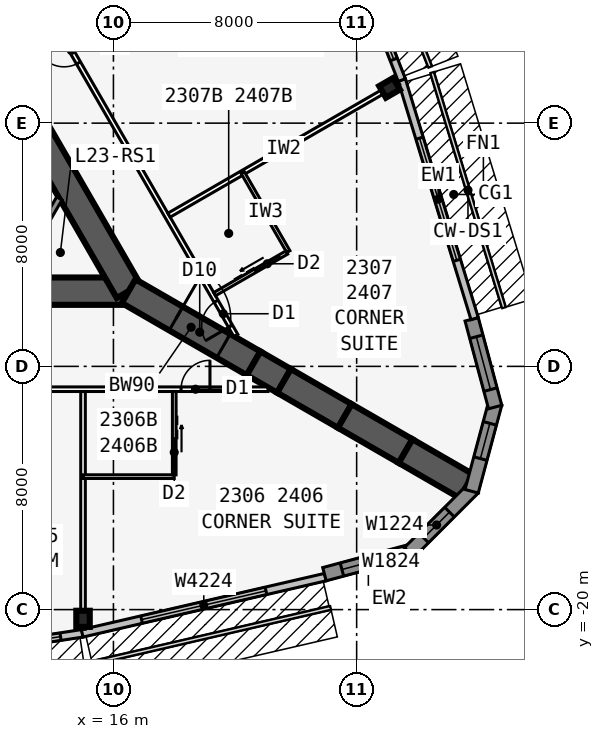
"""IFC4 building model, lengths in metres.
Left out: names, types, materials, properties, quantities, classifications, styles, units other than length and angle.
Written with IfcOpenShell. Run it as: python <this file> out.ifc"""

import sys

from ifc_helpers import new_model, si_unit, direction, frame, frame_2d, origin, origin_2d, place, context, subcontext, project, spatial, polyline, rectangle, i_section, outline, extrude, element, fill, save


model = new_model("IFC4")
c1 = context("Model", 3, precision=1e-05, world=origin(), true_north=direction((0.0, 1.0)))
c2 = subcontext(c1, "Body", "Model", "MODEL_VIEW")
j1 = project(units=[si_unit("LENGTHUNIT", "METRE"), si_unit("PLANEANGLEUNIT", "RADIAN")], contexts=[c1])
p1 = place(None, origin())
s1 = spatial("IfcSite", under=j1, at=p1, CompositionType="ELEMENT")
p2 = place(p1, origin())
s2 = spatial("IfcBuilding", under=s1, at=p2, CompositionType="ELEMENT")
p3 = place(p2, frame((0.0, 0.0, 89.7)))
s3 = spatial("IfcBuildingStorey", under=s2, at=p3, CompositionType="ELEMENT", Elevation=89.7)
p4 = place(p3, frame((-16.5, -9.526, 0.0), z_axis=(0.0, 0.0, 1.0), x_axis=(1.0, 0.0, 0.0)))
e1 = element("IfcWall", 1, at=p4, inside=s3, PredefinedType="SHEAR", context=c2, shape_type="SweptSolid", body=[
    extrude(rectangle(XDim=33.0, YDim=0.9, at=frame_2d((16.5, 0.0))), origin(), (0.0, 0.0, 1.0), 3.4),
])
p5 = place(p4, frame((14.05, 0.0, 0.0)))
e2 = element("IfcOpeningElement", 2, at=p5, cuts=e1, PredefinedType="OPENING", context=c2, shape_type="SweptSolid", body=[
    extrude(rectangle(XDim=1.8, YDim=2.13, at=frame_2d((0.9, 1.065))), frame((0.0, 0.46, 0.0), z_axis=(0.0, -1.0, 0.0), x_axis=(1.0, 0.0, 0.0)), (0.0, 0.0, 1.0), 0.92),
])
p6 = place(p3, frame((16.5, -9.526, 0.0), z_axis=(0.0, 0.0, 1.0), x_axis=(-0.499999749417, 0.866025548458, 0.0)))
e3 = element("IfcWall", 3, at=p6, inside=s3, PredefinedType="SHEAR", context=c2, shape_type="SweptSolid", body=[
    extrude(rectangle(XDim=33.0, YDim=0.9, at=frame_2d((16.5, 0.0))), origin(), (0.0, 0.0, 1.0), 3.4),
])
p7 = place(p6, frame((14.15, 0.0, 0.0)))
e4 = element("IfcOpeningElement", 4, at=p7, cuts=e3, PredefinedType="OPENING", context=c2, shape_type="SweptSolid", body=[
    extrude(rectangle(XDim=1.8, YDim=2.13, at=frame_2d((0.9, 1.065))), frame((0.0, 0.46, 0.0), z_axis=(0.0, -1.0, 0.0), x_axis=(1.0, 0.0, 0.0)), (0.0, 0.0, 1.0), 0.92),
])
p8 = place(p6, frame((12.6, 0.0, 0.0)))
e5 = element("IfcOpeningElement", 5, at=p8, cuts=e3, PredefinedType="OPENING", context=c2, shape_type="SweptSolid", body=[
    extrude(rectangle(XDim=1.0, YDim=2.13, at=frame_2d((0.5, 1.065))), frame((0.0, 0.46, 0.0), z_axis=(0.0, -1.0, 0.0), x_axis=(1.0, 0.0, 0.0)), (0.0, 0.0, 1.0), 0.92),
])
p9 = place(p3, frame((16.5, -9.526, 0.0), z_axis=(0.0, 0.0, 1.0), x_axis=(0.866031398331, -0.499989616998, 0.0)))
e6 = element("IfcWall", 6, at=p9, inside=s3, PredefinedType="SHEAR", context=c2, shape_type="SweptSolid", body=[
    extrude(rectangle(XDim=4.746, YDim=0.9, at=frame_2d((2.373, 0.0))), origin(), (0.0, 0.0, 1.0), 3.4),
])
p10 = place(p9, frame((1.8, 0.0, 0.0)))
e7 = element("IfcOpeningElement", 7, at=p10, cuts=e6, PredefinedType="OPENING", context=c2, shape_type="SweptSolid", body=[
    extrude(rectangle(XDim=1.8, YDim=2.13, at=frame_2d((0.9, 1.065))), frame((0.0, 0.46, 0.0), z_axis=(0.0, -1.0, 0.0), x_axis=(1.0, 0.0, 0.0)), (0.0, 0.0, 1.0), 0.92),
])
p11 = place(p3, frame((20.61, -11.899, 0.0), z_axis=(0.0, 0.0, 1.0), x_axis=(0.866009537788, -0.500027479704, 0.0)))
e8 = element("IfcWall", 8, at=p11, inside=s3, PredefinedType="SHEAR", context=c2, shape_type="SweptSolid", body=[
    extrude(rectangle(XDim=1.155, YDim=0.9, at=frame_2d((0.577, 0.0))), origin(), (0.0, 0.0, 1.0), 3.4),
])
for number, where, z_axis, x_axis in (
    (9, (21.61, -12.477, 0.0), (0.0, 0.0, 1.0), (0.866, -0.5, 0.0)),
    (10, (23.61, -13.631, 0.0), (0.0, 0.0, 1.0), (0.866, -0.5, 0.0)),
    (11, (25.61, -14.786, 0.0), (0.0, 0.0, 1.0), (0.866, -0.5, 0.0)),
):
    element("IfcWall", number, at=place(p3, frame(where, z_axis=z_axis, x_axis=x_axis)), inside=s3, PredefinedType="SHEAR", context=c2, shape_type="SweptSolid", body=[
        extrude(rectangle(XDim=2.309, YDim=0.9, at=frame_2d((1.155, 0.0))), origin(), (0.0, 0.0, 1.0), 3.4),
    ])
for number, where, z_axis, x_axis in (
    (12, (15.0, -20.303, 0.0), (0.0, 0.0, 1.0), (1.0, 0.0, 0.0)),
    (13, (25.083, -2.839, 0.0), (0.0, 0.0, 1.0), (-0.5, 0.866, 0.0)),
):
    element("IfcColumn", number, at=place(p3, frame(where, z_axis=z_axis, x_axis=x_axis)), inside=s3, PredefinedType="COLUMN", context=c2, shape_type="SweptSolid", body=[
        extrude(i_section(OverallWidth=0.442, OverallDepth=0.531, WebThickness=0.066, FlangeThickness=0.106, at=origin_2d()), origin(), (0.0, 0.0, 1.0), 3.4),
    ])
p12 = place(p3, frame((9.981, -21.54, 0.0), z_axis=(0.0, 0.0, 1.0), x_axis=(0.988615403399, 0.150464561152, 0.0)))
e14 = element("IfcWall", 14, at=p12, inside=s3, PredefinedType="STANDARD", context=c2, shape_type="SweptSolid", body=[
    extrude(rectangle(XDim=5.058, YDim=0.25, at=frame_2d((2.529, 0.0))), origin(), (0.0, 0.0, 1.0), 3.235),
])
p13 = place(p12, frame((0.729, 0.0, 0.45)))
e15 = element("IfcOpeningElement", 15, at=p13, cuts=e14, PredefinedType="OPENING", context=c2, shape_type="SweptSolid", body=[
    extrude(rectangle(XDim=3.6, YDim=2.4, at=frame_2d((1.8, 1.2))), frame((0.0, 0.135, 0.0), z_axis=(0.0, -1.0, 0.0), x_axis=(1.0, 0.0, 0.0)), (0.0, 0.0, 1.0), 0.27),
])
p14 = place(p3, frame((14.972, -20.781, 0.0), z_axis=(0.0, 0.0, 1.0), x_axis=(0.974279327392, 0.225343720163, 0.0)))
e16 = element("IfcWall", 16, at=p14, inside=s3, PredefinedType="STANDARD", context=c2, shape_type="SweptSolid", body=[
    extrude(rectangle(XDim=8.211, YDim=0.25, at=frame_2d((4.105, 0.0))), origin(), (0.0, 0.0, 1.0), 3.235),
])
p15 = place(p14, frame((2.006, 0.0, 0.45)))
e17 = element("IfcOpeningElement", 17, at=p15, cuts=e16, PredefinedType="OPENING", context=c2, shape_type="SweptSolid", body=[
    extrude(rectangle(XDim=4.2, YDim=2.4, at=frame_2d((2.1, 1.2))), frame((0.0, 0.135, 0.0), z_axis=(0.0, -1.0, 0.0), x_axis=(1.0, 0.0, 0.0)), (0.0, 0.0, 1.0), 0.27),
])
p16 = place(p3, frame((22.942, -18.835, 0.0), z_axis=(0.0, 0.0, 1.0), x_axis=(0.965930548995, 0.258801419081, 0.0)))
e18 = element("IfcWall", 18, at=p16, inside=s3, PredefinedType="SOLIDWALL", context=c2, shape_type="SweptSolid", body=[
    extrude(rectangle(XDim=2.989, YDim=0.45, at=frame_2d((1.494, 0.0))), origin(), (0.0, 0.0, 1.0), 3.235),
])
p17 = place(p16, frame((0.594, 0.0, 0.45)))
e19 = element("IfcOpeningElement", 19, at=p17, cuts=e18, PredefinedType="OPENING", context=c2, shape_type="SweptSolid", body=[
    extrude(rectangle(XDim=1.8, YDim=2.4, at=frame_2d((0.9, 1.2))), frame((0.0, 0.235, 0.0), z_axis=(0.0, -1.0, 0.0), x_axis=(1.0, 0.0, 0.0)), (0.0, 0.0, 1.0), 0.47),
])
p18 = place(p3, frame((25.728, -18.12, 0.0), z_axis=(0.0, 0.0, 1.0), x_axis=(0.707025086683, 0.707188466253, 0.0)))
e20 = element("IfcWall", 20, at=p18, inside=s3, PredefinedType="SOLIDWALL", context=c2, shape_type="SweptSolid", body=[
    extrude(outline(polyline([(2.989, 0.225), (2.93, 0.225), (2.438, 0.093), (2.402, 0.225), (0.0, 0.225), (0.0, -0.225), (2.989, -0.225), (2.989, 0.225)])), origin(), (0.0, 0.0, 1.0), 3.235),
])
p19 = place(p18, frame((0.676, 0.0, 0.45)))
e21 = element("IfcOpeningElement", 21, at=p19, cuts=e20, PredefinedType="OPENING", context=c2, shape_type="SweptSolid", body=[
    extrude(rectangle(XDim=1.2, YDim=2.4, at=frame_2d((0.6, 1.2))), frame((0.0, 0.235, 0.0), z_axis=(0.0, -1.0, 0.0), x_axis=(1.0, 0.0, 0.0)), (0.0, 0.0, 1.0), 0.47),
])
p20 = place(p3, frame((27.783, -16.108, 0.0), z_axis=(0.0, 0.0, 1.0), x_axis=(0.258801419081, 0.965930548995, 0.0)))
e22 = element("IfcWall", 22, at=p20, inside=s3, PredefinedType="SOLIDWALL", context=c2, shape_type="SweptSolid", body=[
    extrude(outline(polyline([(2.989, 0.225), (0.586, 0.225), (0.551, 0.093), (0.06, 0.225), (0.0, 0.225), (0.0, -0.225), (2.989, -0.225), (2.989, 0.225)])), origin(), (0.0, 0.0, 1.0), 3.235),
])
p21 = place(p20, frame((1.113, 0.0, 0.45)))
e23 = element("IfcOpeningElement", 23, at=p21, cuts=e22, PredefinedType="OPENING", context=c2, shape_type="SweptSolid", body=[
    extrude(rectangle(XDim=1.2, YDim=2.4, at=frame_2d((0.6, 1.2))), frame((0.0, 0.235, 0.0), z_axis=(0.0, -1.0, 0.0), x_axis=(1.0, 0.0, 0.0)), (0.0, 0.0, 1.0), 0.47),
])
p22 = place(p3, frame((28.556, -13.337, 0.0), z_axis=(0.0, 0.0, 1.0), x_axis=(-0.258780998834, 0.965936019953, 0.0)))
e24 = element("IfcWall", 24, at=p22, inside=s3, PredefinedType="SOLIDWALL", context=c2, shape_type="SweptSolid", body=[
    extrude(rectangle(XDim=2.989, YDim=0.45, at=frame_2d((1.494, 0.0))), origin(), (0.0, 0.0, 1.0), 3.235),
])
p23 = place(p22, frame((0.594, 0.0, 0.45)))
e25 = element("IfcOpeningElement", 25, at=p23, cuts=e24, PredefinedType="OPENING", context=c2, shape_type="SweptSolid", body=[
    extrude(rectangle(XDim=1.8, YDim=2.4, at=frame_2d((0.9, 1.2))), frame((0.0, 0.235, 0.0), z_axis=(0.0, -1.0, 0.0), x_axis=(1.0, 0.0, 0.0)), (0.0, 0.0, 1.0), 0.47),
])
p24 = place(p3, frame((27.88, -10.429, 0.0), z_axis=(0.0, 0.0, 1.0), x_axis=(-0.2919790669, 0.956424709265, 0.0)))
e26 = element("IfcWall", 26, at=p24, inside=s3, PredefinedType="STANDARD", context=c2, shape_type="SweptSolid", body=[
    extrude(rectangle(XDim=8.211, YDim=0.25, at=frame_2d((4.105, 0.0))), origin(), (0.0, 0.0, 1.0), 3.235),
])
p25 = place(p24, frame((2.006, 0.0, 0.45)))
e27 = element("IfcOpeningElement", 27, at=p25, cuts=e26, PredefinedType="OPENING", context=c2, shape_type="SweptSolid", body=[
    extrude(rectangle(XDim=4.2, YDim=2.4, at=frame_2d((2.1, 1.2))), frame((0.0, 0.135, 0.0), z_axis=(0.0, -1.0, 0.0), x_axis=(1.0, 0.0, 0.0)), (0.0, 0.0, 1.0), 0.27),
])
p26 = place(p3, frame((25.486, -2.584, 0.0), z_axis=(0.0, 0.0, 1.0), x_axis=(-0.364013463868, 0.931393685894, 0.0)))
e28 = element("IfcWall", 28, at=p26, inside=s3, PredefinedType="STANDARD", context=c2, shape_type="SweptSolid", body=[
    extrude(rectangle(XDim=5.058, YDim=0.25, at=frame_2d((2.529, 0.0))), origin(), (0.0, 0.0, 1.0), 3.235),
])
p27 = place(p26, frame((0.729, 0.0, 0.45)))
e29 = element("IfcOpeningElement", 29, at=p27, cuts=e28, PredefinedType="OPENING", context=c2, shape_type="SweptSolid", body=[
    extrude(rectangle(XDim=3.6, YDim=2.4, at=frame_2d((1.8, 1.2))), frame((0.0, 0.135, 0.0), z_axis=(0.0, -1.0, 0.0), x_axis=(1.0, 0.0, 0.0)), (0.0, 0.0, 1.0), 0.27),
])
p28 = place(p3, frame((-21.086, -12.751, 0.0), z_axis=(0.0, 0.0, 1.0), x_axis=(1.0, 0.0, 0.0)))
e30 = element("IfcWall", 30, at=p28, inside=s3, PredefinedType="PARTITIONING", context=c2, shape_type="SweptSolid", body=[
    extrude(rectangle(XDim=42.172, YDim=0.15, at=frame_2d((21.086, 0.0))), origin(), (0.0, 0.0, 1.0), 3.235),
])
p29 = place(p28, frame((1.911, 0.0, 0.0)))
e31 = element("IfcOpeningElement", 31, at=p29, cuts=e30, PredefinedType="OPENING", context=c2, shape_type="SweptSolid", body=[
    extrude(rectangle(XDim=0.95, YDim=2.13, at=frame_2d((0.475, 1.065))), frame((0.0, 0.085, 0.0), z_axis=(0.0, -1.0, 0.0), x_axis=(1.0, 0.0, 0.0)), (0.0, 0.0, 1.0), 0.17),
])
p30 = place(p28, frame((11.911, 0.0, 0.0)))
e32 = element("IfcOpeningElement", 32, at=p30, cuts=e30, PredefinedType="OPENING", context=c2, shape_type="SweptSolid", body=[
    extrude(rectangle(XDim=0.95, YDim=2.13, at=frame_2d((0.475, 1.065))), frame((0.0, 0.085, 0.0), z_axis=(0.0, -1.0, 0.0), x_axis=(1.0, 0.0, 0.0)), (0.0, 0.0, 1.0), 0.17),
])
p31 = place(p28, frame((18.711, 0.0, 0.0)))
e33 = element("IfcOpeningElement", 33, at=p31, cuts=e30, PredefinedType="OPENING", context=c2, shape_type="SweptSolid", body=[
    extrude(rectangle(XDim=0.95, YDim=2.13, at=frame_2d((0.475, 1.065))), frame((0.0, 0.085, 0.0), z_axis=(0.0, -1.0, 0.0), x_axis=(1.0, 0.0, 0.0)), (0.0, 0.0, 1.0), 0.17),
])
p32 = place(p28, frame((23.086, 0.0, 0.0)))
e34 = element("IfcOpeningElement", 34, at=p32, cuts=e30, PredefinedType="OPENING", context=c2, shape_type="SweptSolid", body=[
    extrude(rectangle(XDim=1.0, YDim=2.13, at=frame_2d((0.5, 1.065))), frame((0.0, 0.085, 0.0), z_axis=(0.0, -1.0, 0.0), x_axis=(1.0, 0.0, 0.0)), (0.0, 0.0, 1.0), 0.17),
])
p33 = place(p28, frame((27.511, 0.0, 0.0)))
e35 = element("IfcOpeningElement", 35, at=p33, cuts=e30, PredefinedType="OPENING", context=c2, shape_type="SweptSolid", body=[
    extrude(rectangle(XDim=0.95, YDim=2.13, at=frame_2d((0.475, 1.065))), frame((0.0, 0.085, 0.0), z_axis=(0.0, -1.0, 0.0), x_axis=(1.0, 0.0, 0.0)), (0.0, 0.0, 1.0), 0.17),
])
p34 = place(p28, frame((33.711, 0.0, 0.0)))
e36 = element("IfcOpeningElement", 36, at=p34, cuts=e30, PredefinedType="OPENING", context=c2, shape_type="SweptSolid", body=[
    extrude(rectangle(XDim=0.95, YDim=2.13, at=frame_2d((0.475, 1.065))), frame((0.0, 0.085, 0.0), z_axis=(0.0, -1.0, 0.0), x_axis=(1.0, 0.0, 0.0)), (0.0, 0.0, 1.0), 0.17),
])
p35 = place(p28, frame((39.311, 0.0, 0.0)))
e37 = element("IfcOpeningElement", 37, at=p35, cuts=e30, PredefinedType="OPENING", context=c2, shape_type="SweptSolid", body=[
    extrude(rectangle(XDim=0.95, YDim=2.13, at=frame_2d((0.475, 1.065))), frame((0.0, 0.085, 0.0), z_axis=(0.0, -1.0, 0.0), x_axis=(1.0, 0.0, 0.0)), (0.0, 0.0, 1.0), 0.17),
])
p36 = place(p3, frame((15.0, -12.826, 0.0), z_axis=(0.0, 0.0, 1.0), x_axis=(0.0, -1.0, 0.0)))
e38 = element("IfcWall", 38, at=p36, inside=s3, PredefinedType="PARTITIONING", context=c2, shape_type="SweptSolid", body=[
    extrude(rectangle(XDim=7.82, YDim=0.15, at=frame_2d((3.91, 0.0))), origin(), (0.0, 0.0, 1.0), 2.389),
])
p37 = place(p3, frame((15.0, -15.626, 0.0), z_axis=(0.0, 0.0, 1.0), x_axis=(1.0, 0.0, 0.0)))
e39 = element("IfcWall", 39, at=p37, inside=s3, PredefinedType="PLUMBINGWALL", context=c2, shape_type="SweptSolid", body=[
    extrude(rectangle(XDim=3.0, YDim=0.12, at=frame_2d((1.5, 0.0))), origin(), (0.0, 0.0, 1.0), 3.235),
])
p38 = place(p3, frame((18.0, -12.826, 0.0), z_axis=(0.0, 0.0, 1.0), x_axis=(0.0, -1.0, 0.0)))
e40 = element("IfcWall", 40, at=p38, inside=s3, PredefinedType="PLUMBINGWALL", context=c2, shape_type="SweptSolid", body=[
    extrude(rectangle(XDim=2.74, YDim=0.12, at=frame_2d((1.37, 0.0))), origin(), (0.0, 0.0, 1.0), 3.235),
])
p39 = place(p38, frame((1.55, 0.0, 0.0)))
e41 = element("IfcOpeningElement", 41, at=p39, cuts=e40, PredefinedType="OPENING", context=c2, shape_type="SweptSolid", body=[
    extrude(rectangle(XDim=0.9, YDim=2.13, at=frame_2d((0.45, 1.065))), frame((0.0, 0.07, 0.0), z_axis=(0.0, -1.0, 0.0), x_axis=(1.0, 0.0, 0.0)), (0.0, 0.0, 1.0), 0.14),
])
p40 = place(p3, frame((20.027, -10.985, 0.0), z_axis=(0.0, 0.0, 1.0), x_axis=(-0.500001677587, 0.866024435227, 0.0)))
e42 = element("IfcWall", 42, at=p40, inside=s3, PredefinedType="PARTITIONING", context=c2, shape_type="SweptSolid", body=[
    extrude(rectangle(XDim=39.054, YDim=0.15, at=frame_2d((19.527, 0.0))), origin(), (0.0, 0.0, 1.0), 3.235),
])
p41 = place(p40, frame((0.352, 0.0, 0.0)))
e43 = element("IfcOpeningElement", 43, at=p41, cuts=e42, PredefinedType="OPENING", context=c2, shape_type="SweptSolid", body=[
    extrude(rectangle(XDim=0.95, YDim=2.13, at=frame_2d((0.475, 1.065))), frame((0.0, 0.085, 0.0), z_axis=(0.0, -1.0, 0.0), x_axis=(1.0, 0.0, 0.0)), (0.0, 0.0, 1.0), 0.17),
])
p42 = place(p40, frame((10.352, 0.0, 0.0)))
e44 = element("IfcOpeningElement", 44, at=p42, cuts=e42, PredefinedType="OPENING", context=c2, shape_type="SweptSolid", body=[
    extrude(rectangle(XDim=0.95, YDim=2.13, at=frame_2d((0.475, 1.065))), frame((0.0, 0.085, 0.0), z_axis=(0.0, -1.0, 0.0), x_axis=(1.0, 0.0, 0.0)), (0.0, 0.0, 1.0), 0.17),
])
p43 = place(p40, frame((17.752, 0.0, 0.0)))
e45 = element("IfcOpeningElement", 45, at=p43, cuts=e42, PredefinedType="OPENING", context=c2, shape_type="SweptSolid", body=[
    extrude(rectangle(XDim=0.95, YDim=2.13, at=frame_2d((0.475, 1.065))), frame((0.0, 0.085, 0.0), z_axis=(0.0, -1.0, 0.0), x_axis=(1.0, 0.0, 0.0)), (0.0, 0.0, 1.0), 0.17),
])
p44 = place(p40, frame((26.552, 0.0, 0.0)))
e46 = element("IfcOpeningElement", 46, at=p44, cuts=e42, PredefinedType="OPENING", context=c2, shape_type="SweptSolid", body=[
    extrude(rectangle(XDim=0.95, YDim=2.13, at=frame_2d((0.475, 1.065))), frame((0.0, 0.085, 0.0), z_axis=(0.0, -1.0, 0.0), x_axis=(1.0, 0.0, 0.0)), (0.0, 0.0, 1.0), 0.17),
])
p45 = place(p40, frame((37.752, 0.0, 0.0)))
e47 = element("IfcOpeningElement", 47, at=p45, cuts=e42, PredefinedType="OPENING", context=c2, shape_type="SweptSolid", body=[
    extrude(rectangle(XDim=0.95, YDim=2.13, at=frame_2d((0.475, 1.065))), frame((0.0, 0.085, 0.0), z_axis=(0.0, -1.0, 0.0), x_axis=(1.0, 0.0, 0.0)), (0.0, 0.0, 1.0), 0.17),
])
p46 = place(p3, frame((17.829, -7.027, 0.0), z_axis=(0.0, 0.0, 1.0), x_axis=(0.866032659912, 0.499987431809, 0.0)))
e48 = element("IfcWall", 48, at=p46, inside=s3, PredefinedType="PARTITIONING", context=c2, shape_type="SweptSolid", body=[
    extrude(rectangle(XDim=8.72, YDim=0.15, at=frame_2d((4.36, 0.0))), origin(), (0.0, 0.0, 1.0), 2.389),
])
p47 = place(p3, frame((21.753, -8.225, 0.0), z_axis=(0.0, 0.0, 1.0), x_axis=(-0.499990139034, 0.866031096941, 0.0)))
e49 = element("IfcWall", 49, at=p47, inside=s3, PredefinedType="PLUMBINGWALL", context=c2, shape_type="SweptSolid", body=[
    extrude(rectangle(XDim=3.0, YDim=0.12, at=frame_2d((1.5, 0.0))), origin(), (0.0, 0.0, 1.0), 3.235),
])
p48 = place(p3, frame((19.329, -9.625, 0.0), z_axis=(0.0, 0.0, 1.0), x_axis=(0.866035715982, 0.499982138324, 0.0)))
e50 = element("IfcWall", 50, at=p48, inside=s3, PredefinedType="PLUMBINGWALL", context=c2, shape_type="SweptSolid", body=[
    extrude(rectangle(XDim=2.74, YDim=0.12, at=frame_2d((1.37, 0.0))), origin(), (0.0, 0.0, 1.0), 3.235),
])
p49 = place(p48, frame((1.55, 0.0, 0.0)))
e51 = element("IfcOpeningElement", 51, at=p49, cuts=e50, PredefinedType="OPENING", context=c2, shape_type="SweptSolid", body=[
    extrude(rectangle(XDim=0.9, YDim=2.13, at=frame_2d((0.45, 1.065))), frame((0.0, 0.07, 0.0), z_axis=(0.0, -1.0, 0.0), x_axis=(1.0, 0.0, 0.0)), (0.0, 0.0, 1.0), 0.14),
])
p50 = place(p3, frame((14.219, -6.476, 0.0), z_axis=(0.0, 0.0, 1.0), x_axis=(-0.499952404951, -0.866052881055, 0.0)))
e52 = element("IfcWall", 52, at=p50, inside=s3, PredefinedType="SOLIDWALL", context=c2, shape_type="SweptSolid", body=[
    extrude(rectangle(XDim=3.002, YDim=0.2, at=frame_2d((1.501, 0.0))), origin(), (0.0, 0.0, 1.0), 3.235),
])
p51 = place(p13, origin())
e53 = element("IfcWindow", 53, at=p51, inside=s3, PartitioningType="SINGLE_PANEL", PredefinedType="WINDOW", context=c2, shape_type="SweptSolid", body=[
    extrude(rectangle(XDim=3.6, YDim=2.4, at=frame_2d((1.8, 1.2))), frame((0.0, 0.03, 0.0), z_axis=(0.0, -1.0, 0.0), x_axis=(1.0, 0.0, 0.0)), (0.0, 0.0, 1.0), 0.06),
])
fill(e15, e53)
p52 = place(p15, origin())
e54 = element("IfcWindow", 54, at=p52, inside=s3, PartitioningType="SINGLE_PANEL", PredefinedType="WINDOW", context=c2, shape_type="SweptSolid", body=[
    extrude(rectangle(XDim=4.2, YDim=2.4, at=frame_2d((2.1, 1.2))), frame((0.0, 0.03, 0.0), z_axis=(0.0, -1.0, 0.0), x_axis=(1.0, 0.0, 0.0)), (0.0, 0.0, 1.0), 0.06),
])
fill(e17, e54)
p53 = place(p17, origin())
e55 = element("IfcWindow", 55, at=p53, inside=s3, PartitioningType="SINGLE_PANEL", PredefinedType="WINDOW", context=c2, shape_type="SweptSolid", body=[
    extrude(rectangle(XDim=1.8, YDim=2.4, at=frame_2d((0.9, 1.2))), frame((0.0, 0.03, 0.0), z_axis=(0.0, -1.0, 0.0), x_axis=(1.0, 0.0, 0.0)), (0.0, 0.0, 1.0), 0.06),
])
fill(e19, e55)
p54 = place(p19, origin())
e56 = element("IfcWindow", 56, at=p54, inside=s3, PartitioningType="SINGLE_PANEL", PredefinedType="WINDOW", context=c2, shape_type="SweptSolid", body=[
    extrude(rectangle(XDim=1.2, YDim=2.4, at=frame_2d((0.6, 1.2))), frame((0.0, 0.03, 0.0), z_axis=(0.0, -1.0, 0.0), x_axis=(1.0, 0.0, 0.0)), (0.0, 0.0, 1.0), 0.06),
])
fill(e21, e56)
p55 = place(p21, origin())
e57 = element("IfcWindow", 57, at=p55, inside=s3, PartitioningType="SINGLE_PANEL", PredefinedType="WINDOW", context=c2, shape_type="SweptSolid", body=[
    extrude(rectangle(XDim=1.2, YDim=2.4, at=frame_2d((0.6, 1.2))), frame((0.0, 0.03, 0.0), z_axis=(0.0, -1.0, 0.0), x_axis=(1.0, 0.0, 0.0)), (0.0, 0.0, 1.0), 0.06),
])
fill(e23, e57)
p56 = place(p23, origin())
e58 = element("IfcWindow", 58, at=p56, inside=s3, PartitioningType="SINGLE_PANEL", PredefinedType="WINDOW", context=c2, shape_type="SweptSolid", body=[
    extrude(rectangle(XDim=1.8, YDim=2.4, at=frame_2d((0.9, 1.2))), frame((0.0, 0.03, 0.0), z_axis=(0.0, -1.0, 0.0), x_axis=(1.0, 0.0, 0.0)), (0.0, 0.0, 1.0), 0.06),
])
fill(e25, e58)
p57 = place(p25, origin())
e59 = element("IfcWindow", 59, at=p57, inside=s3, PartitioningType="SINGLE_PANEL", PredefinedType="WINDOW", context=c2, shape_type="SweptSolid", body=[
    extrude(rectangle(XDim=4.2, YDim=2.4, at=frame_2d((2.1, 1.2))), frame((0.0, 0.03, 0.0), z_axis=(0.0, -1.0, 0.0), x_axis=(1.0, 0.0, 0.0)), (0.0, 0.0, 1.0), 0.06),
])
fill(e27, e59)
p58 = place(p27, origin())
e60 = element("IfcWindow", 60, at=p58, inside=s3, PartitioningType="SINGLE_PANEL", PredefinedType="WINDOW", context=c2, shape_type="SweptSolid", body=[
    extrude(rectangle(XDim=3.6, YDim=2.4, at=frame_2d((1.8, 1.2))), frame((0.0, 0.03, 0.0), z_axis=(0.0, -1.0, 0.0), x_axis=(1.0, 0.0, 0.0)), (0.0, 0.0, 1.0), 0.06),
])
fill(e29, e60)
p59 = place(p39, origin())
e61 = element("IfcDoor", 61, at=p59, inside=s3, OperationType="SLIDING_TO_LEFT", PredefinedType="DOOR", context=c2, shape_type="SweptSolid", body=[
    extrude(rectangle(XDim=0.9, YDim=2.13, at=frame_2d((0.45, 1.065))), frame((0.0, 0.025, 0.0), z_axis=(0.0, -1.0, 0.0), x_axis=(1.0, 0.0, 0.0)), (0.0, 0.0, 1.0), 0.05),
])
fill(e41, e61)
p60 = place(p35, origin())
e62 = element("IfcDoor", 62, at=p60, inside=s3, OperationType="SINGLE_SWING_RIGHT", PredefinedType="DOOR", context=c2, shape_type="SweptSolid", body=[
    extrude(rectangle(XDim=0.95, YDim=2.13, at=frame_2d((0.475, 1.065))), frame((0.0, 0.025, 0.0), z_axis=(0.0, -1.0, 0.0), x_axis=(1.0, 0.0, 0.0)), (0.0, 0.0, 1.0), 0.05),
])
fill(e37, e62)
p61 = place(p49, origin())
e63 = element("IfcDoor", 63, at=p61, inside=s3, OperationType="SLIDING_TO_LEFT", PredefinedType="DOOR", context=c2, shape_type="SweptSolid", body=[
    extrude(rectangle(XDim=0.9, YDim=2.13, at=frame_2d((0.45, 1.065))), frame((0.0, 0.025, 0.0), z_axis=(0.0, -1.0, 0.0), x_axis=(1.0, 0.0, 0.0)), (0.0, 0.0, 1.0), 0.05),
])
fill(e51, e63)
p62 = place(p41, origin())
e64 = element("IfcDoor", 64, at=p62, inside=s3, OperationType="SINGLE_SWING_LEFT", PredefinedType="DOOR", context=c2, shape_type="SweptSolid", body=[
    extrude(rectangle(XDim=0.95, YDim=2.13, at=frame_2d((0.475, 1.065))), frame((0.0, 0.025, 0.0), z_axis=(0.0, -1.0, 0.0), x_axis=(1.0, 0.0, 0.0)), (0.0, 0.0, 1.0), 0.05),
])
fill(e43, e64)
p63 = place(p42, origin())
e65 = element("IfcDoor", 65, at=p63, inside=s3, OperationType="SINGLE_SWING_RIGHT", PredefinedType="DOOR", context=c2, shape_type="SweptSolid", body=[
    extrude(rectangle(XDim=0.95, YDim=2.13, at=frame_2d((0.475, 1.065))), frame((0.0, 0.025, 0.0), z_axis=(0.0, -1.0, 0.0), x_axis=(1.0, 0.0, 0.0)), (0.0, 0.0, 1.0), 0.05),
])
fill(e44, e65)
p64 = place(p10, origin())
e66 = element("IfcDoor", 66, at=p64, inside=s3, OperationType="DOUBLE_DOOR_DOUBLE_SWING", PredefinedType="DOOR", context=c2, shape_type="SweptSolid", body=[
    extrude(rectangle(XDim=1.8, YDim=2.13, at=frame_2d((0.9, 1.065))), frame((0.0, 0.025, 0.0), z_axis=(0.0, -1.0, 0.0), x_axis=(1.0, 0.0, 0.0)), (0.0, 0.0, 1.0), 0.05),
])
fill(e7, e66)
save(model, sys.argv[1])
